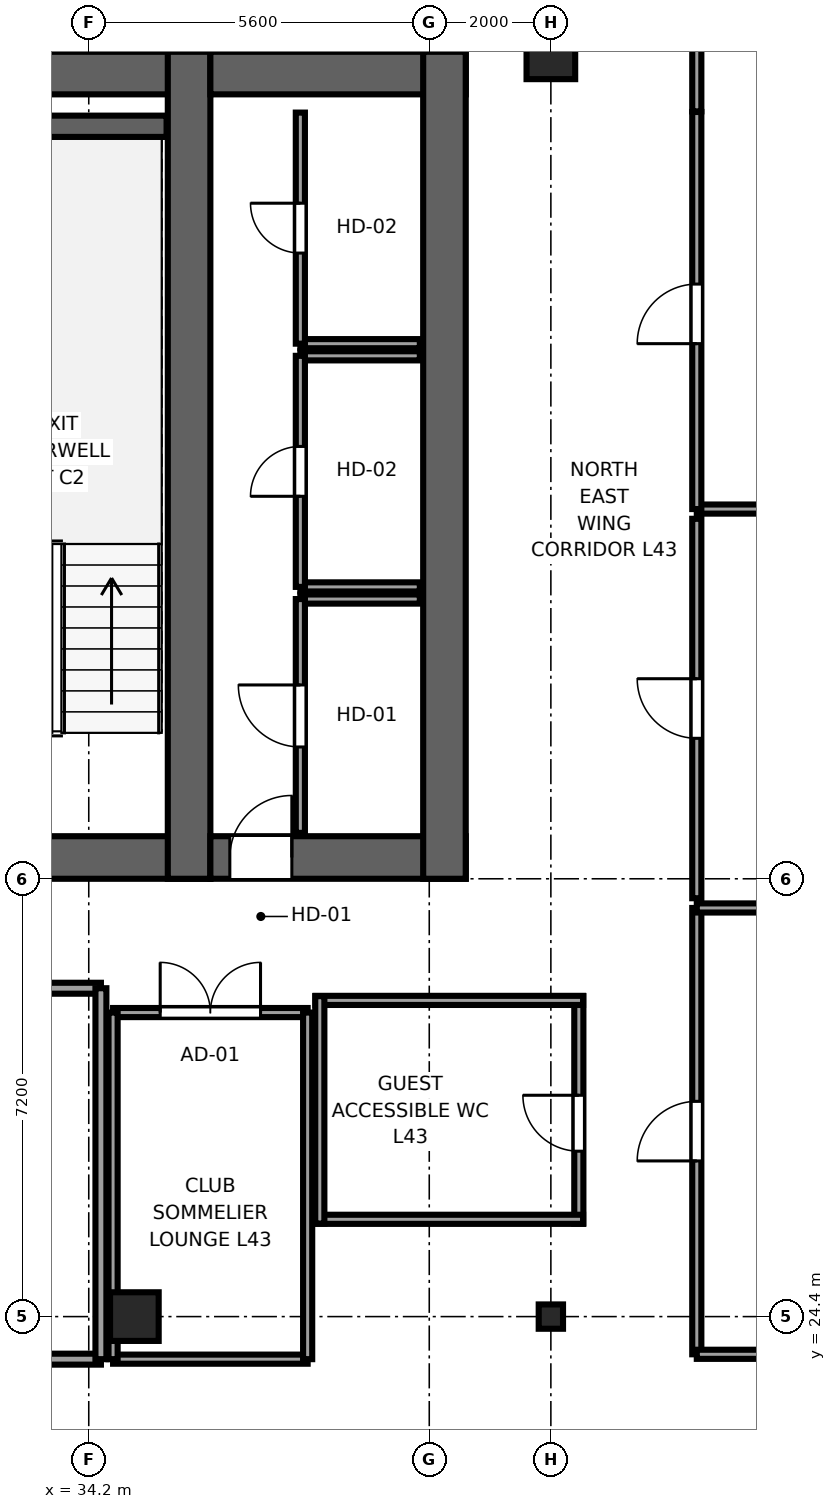
"""IFC4 building model, lengths in metres.
Left out: names, types, materials, properties, quantities, classifications, styles, units other than length and angle.
Written with IfcOpenShell. Run it as: python <this file> out.ifc"""

import sys

from ifc_helpers import new_model, si_unit, direction, frame, frame_2d, origin, origin_2d, place, context, subcontext, project, spatial, rectangle, i_section, extrude, source, transform, mapped, element, fill, save


model = new_model("IFC4")
c1 = context("Model", 3, precision=1e-05, world=origin(), true_north=direction((0.0, 1.0)))
c2 = subcontext(c1, "Body", "Model", "MODEL_VIEW")
j1 = project(units=[si_unit("LENGTHUNIT", "METRE"), si_unit("PLANEANGLEUNIT", "RADIAN")], contexts=[c1])
p1 = place(None, origin())
s1 = spatial("IfcSite", under=j1, at=p1, CompositionType="ELEMENT")
p2 = place(p1, origin())
s2 = spatial("IfcBuilding", under=s1, at=p2, CompositionType="ELEMENT")
p3 = place(p2, frame((0.0, 0.0, 164.8)))
s3 = spatial("IfcBuildingStorey", under=s2, at=p3, CompositionType="ELEMENT", Elevation=164.8)
p4 = place(p3, frame((9.8, 31.95, 0.0), z_axis=(0.0, 0.0, 1.0), x_axis=(1.0, 0.0, 0.0)))
e1 = element("IfcWall", 1, at=p4, inside=s3, PredefinedType="SHEAR", context=c2, shape_type="SweptSolid", body=[
    extrude(rectangle(XDim=26.4, YDim=0.7, at=frame_2d((13.2, 0.0))), origin(), (0.0, 0.0, 1.0), 3.55),
])
p5 = place(p4, frame((6.32, 0.0, 0.0), z_axis=(0.0, 0.0, 1.0), x_axis=(-1.0, 0.0, 0.0)))
e2 = element("IfcOpeningElement", 2, at=p5, cuts=e1, PredefinedType="OPENING", context=c2, shape_type="SweptSolid", body=[
    extrude(rectangle(XDim=1.5, YDim=2.04, at=frame_2d((0.75, 1.02))), frame((0.0, 0.36, 0.0), z_axis=(0.0, -1.0, 0.0), x_axis=(1.0, 0.0, 0.0)), (0.0, 0.0, 1.0), 0.72),
])
p6 = place(p4, frame((13.95, 0.0, 0.0), z_axis=(0.0, 0.0, 1.0), x_axis=(-1.0, 0.0, 0.0)))
e3 = element("IfcOpeningElement", 3, at=p6, cuts=e1, PredefinedType="OPENING", context=c2, shape_type="SweptSolid", body=[
    extrude(rectangle(XDim=1.5, YDim=2.04, at=frame_2d((0.75, 1.02))), frame((0.0, 0.36, 0.0), z_axis=(0.0, -1.0, 0.0), x_axis=(1.0, 0.0, 0.0)), (0.0, 0.0, 1.0), 0.72),
])
p7 = place(p4, frame((20.25, 0.0, 0.0), z_axis=(0.0, 0.0, 1.0), x_axis=(-1.0, 0.0, 0.0)))
e4 = element("IfcOpeningElement", 4, at=p7, cuts=e1, PredefinedType="OPENING", context=c2, shape_type="SweptSolid", body=[
    extrude(rectangle(XDim=1.5, YDim=2.04, at=frame_2d((0.75, 1.02))), frame((0.0, 0.36, 0.0), z_axis=(0.0, -1.0, 0.0), x_axis=(1.0, 0.0, 0.0)), (0.0, 0.0, 1.0), 0.72),
])
p8 = place(p4, frame((8.37, 0.0, 0.0), z_axis=(0.0, 0.0, 1.0), x_axis=(-1.0, 0.0, 0.0)))
e5 = element("IfcOpeningElement", 5, at=p8, cuts=e1, PredefinedType="OPENING", context=c2, shape_type="SweptSolid", body=[
    extrude(rectangle(XDim=0.82, YDim=2.01, at=frame_2d((0.41, 1.005))), frame((0.0, 0.36, 0.0), z_axis=(0.0, -1.0, 0.0), x_axis=(1.0, 0.0, 0.0)), (0.0, 0.0, 1.0), 0.72),
])
p9 = place(p3, frame((9.8, 44.85, 0.0), z_axis=(0.0, 0.0, 1.0), x_axis=(1.0, 0.0, 0.0)))
e6 = element("IfcWall", 6, at=p9, inside=s3, PredefinedType="SHEAR", context=c2, shape_type="SweptSolid", body=[
    extrude(rectangle(XDim=26.4, YDim=0.7, at=frame_2d((13.2, 0.0))), origin(), (0.0, 0.0, 1.0), 3.55),
])
p10 = place(p3, frame((35.85, 31.6, 0.0), z_axis=(0.0, 0.0, 1.0), x_axis=(0.0, 1.0, 0.0)))
e7 = element("IfcWall", 7, at=p10, inside=s3, PredefinedType="SHEAR", context=c2, shape_type="SweptSolid", body=[
    extrude(rectangle(XDim=13.6, YDim=0.7, at=frame_2d((6.8, 0.0))), origin(), (0.0, 0.0, 1.0), 3.55),
])
p11 = place(p3, frame((36.2, 31.95, 0.0), z_axis=(0.0, 0.0, 1.0), x_axis=(1.0, 0.0, 0.0)))
e8 = element("IfcWall", 8, at=p11, inside=s3, PredefinedType="SHEAR", context=c2, shape_type="SweptSolid", body=[
    extrude(rectangle(XDim=4.2, YDim=0.7, at=frame_2d((2.1, 0.0))), origin(), (0.0, 0.0, 1.0), 3.55),
])
p12 = place(p11, frame((1.34, 0.0, 0.0), z_axis=(0.0, 0.0, 1.0), x_axis=(-1.0, 0.0, 0.0)))
e9 = element("IfcOpeningElement", 9, at=p12, cuts=e8, PredefinedType="OPENING", context=c2, shape_type="SweptSolid", body=[
    extrude(rectangle(XDim=1.02, YDim=2.03, at=frame_2d((0.51, 1.015))), frame((0.0, 0.36, 0.0), z_axis=(0.0, -1.0, 0.0), x_axis=(1.0, 0.0, 0.0)), (0.0, 0.0, 1.0), 0.72),
])
p13 = place(p3, frame((36.2, 44.85, 0.0), z_axis=(0.0, 0.0, 1.0), x_axis=(1.0, 0.0, 0.0)))
e10 = element("IfcWall", 10, at=p13, inside=s3, PredefinedType="SHEAR", context=c2, shape_type="SweptSolid", body=[
    extrude(rectangle(XDim=4.2, YDim=0.7, at=frame_2d((2.1, 0.0))), origin(), (0.0, 0.0, 1.0), 3.55),
])
p14 = place(p3, frame((40.05, 31.6, 0.0), z_axis=(0.0, 0.0, 1.0), x_axis=(0.0, 1.0, 0.0)))
e11 = element("IfcWall", 11, at=p14, inside=s3, PredefinedType="SHEAR", context=c2, shape_type="SweptSolid", body=[
    extrude(rectangle(XDim=13.6, YDim=0.7, at=frame_2d((6.8, 0.0))), origin(), (0.0, 0.0, 1.0), 3.55),
])
p15 = place(p3, frame((31.88, 43.975, 0.0), z_axis=(0.0, 0.0, 1.0), x_axis=(1.0, 0.0, 0.0)))
e12 = element("IfcWall", 12, at=p15, inside=s3, PredefinedType="SHEAR", context=c2, shape_type="SweptSolid", body=[
    extrude(rectangle(XDim=3.6, YDim=0.35, at=frame_2d((1.8, 0.0))), origin(), (0.0, 0.0, 1.0), 3.55),
])
m1 = source(origin(), c2, "Body", "SweptSolid", [
    extrude(rectangle(XDim=0.8, YDim=0.8, at=origin_2d()), origin(), (0.0, 0.0, 1.0), 3.55),
])
p16 = place(p3, frame((34.95, 24.4, 0.0), z_axis=(0.0, 0.0, 1.0), x_axis=(1.0, 0.0, 0.0)))
e13 = element("IfcColumn", 13, at=p16, inside=s3, PredefinedType="COLUMN", context=c2, shape_type="MappedRepresentation", body=[
    mapped(m1, transform((0.0, 0.0, 0.0), x_axis=(1.0, 0.0, 0.0), y_axis=(0.0, 1.0, 0.0), z_axis=(0.0, 0.0, 1.0), scale=1.0)),
])
m2 = source(origin(), c2, "Body", "SweptSolid", [
    extrude(i_section(OverallWidth=0.4, OverallDepth=0.4, WebThickness=0.02, FlangeThickness=0.035, at=origin_2d()), origin(), (0.0, 0.0, 1.0), 3.55),
])
p17 = place(p3, frame((41.8, 24.4, 0.0), z_axis=(0.0, 0.0, 1.0), x_axis=(1.0, 0.0, 0.0)))
e14 = element("IfcColumn", 14, at=p17, inside=s3, PredefinedType="COLUMN", context=c2, shape_type="MappedRepresentation", body=[
    mapped(m2, transform((0.0, 0.0, 0.0), x_axis=(1.0, 0.0, 0.0), y_axis=(0.0, 1.0, 0.0), z_axis=(0.0, 0.0, 1.0), scale=1.0)),
])
p18 = place(p3, frame((41.8, 45.15, 0.0), z_axis=(0.0, 0.0, 1.0), x_axis=(1.0, 0.0, 0.0)))
e15 = element("IfcColumn", 15, at=p18, inside=s3, PredefinedType="COLUMN", context=c2, shape_type="MappedRepresentation", body=[
    mapped(m1, transform((0.0, 0.0, 0.0), x_axis=(1.0, 0.0, 0.0), y_axis=(0.0, 1.0, 0.0), z_axis=(0.0, 0.0, 1.0), scale=1.0)),
])
p19 = place(p3, frame((44.2, 37.68, 0.0), z_axis=(0.0, 0.0, 1.0), x_axis=(1.0, 0.0, 0.0)))
e16 = element("IfcWall", 16, at=p19, inside=s3, PredefinedType="PARTITIONING", context=c2, shape_type="SweptSolid", body=[
    extrude(rectangle(XDim=9.795, YDim=0.15, at=frame_2d((4.897, 0.0))), origin(), (0.0, 0.0, 1.0), 3.37),
])
p20 = place(p3, frame((37.68, 36.2, 0.0), z_axis=(0.0, 0.0, 1.0), x_axis=(1.0, 0.0, 0.0)))
e17 = element("IfcWall", 17, at=p20, inside=s3, PredefinedType="PARTITIONING", context=c2, shape_type="SweptSolid", body=[
    extrude(rectangle(XDim=1.965, YDim=0.15, at=frame_2d((0.982, 0.0))), origin(), (0.0, 0.0, 1.0), 3.37),
])
p21 = place(p3, frame((37.68, 32.355, 0.0), z_axis=(0.0, 0.0, 1.0), x_axis=(0.0, 1.0, 0.0)))
e18 = element("IfcWall", 18, at=p21, inside=s3, PredefinedType="PARTITIONING", context=c2, shape_type="SweptSolid", body=[
    extrude(rectangle(XDim=3.845, YDim=0.15, at=frame_2d((1.922, 0.0))), origin(), (0.0, 0.0, 1.0), 3.37),
])
p22 = place(p21, frame((1.413, 0.0, 0.0)))
e19 = element("IfcOpeningElement", 19, at=p22, cuts=e18, PredefinedType="OPENING", context=c2, shape_type="SweptSolid", body=[
    extrude(rectangle(XDim=1.02, YDim=2.03, at=frame_2d((0.51, 1.015))), frame((0.0, 0.085, 0.0), z_axis=(0.0, -1.0, 0.0), x_axis=(1.0, 0.0, 0.0)), (0.0, 0.0, 1.0), 0.17),
])
for number, where, z_axis, x_axis in (
    (20, (37.68, 36.4, 0.0), (0.0, 0.0, 1.0), (1.0, 0.0, 0.0)),
    (21, (37.68, 40.2, 0.0), (0.0, 0.0, 1.0), (1.0, 0.0, 0.0)),
):
    element("IfcWall", number, at=place(p3, frame(where, z_axis=z_axis, x_axis=x_axis)), inside=s3, PredefinedType="PARTITIONING", context=c2, shape_type="SweptSolid", body=[
        extrude(rectangle(XDim=1.965, YDim=0.15, at=frame_2d((0.982, 0.0))), origin(), (0.0, 0.0, 1.0), 3.37),
    ])
p23 = place(p3, frame((37.68, 36.4, 0.0), z_axis=(0.0, 0.0, 1.0), x_axis=(0.0, 1.0, 0.0)))
e22 = element("IfcWall", 22, at=p23, inside=s3, PredefinedType="PARTITIONING", context=c2, shape_type="SweptSolid", body=[
    extrude(rectangle(XDim=3.8, YDim=0.15, at=frame_2d((1.9, 0.0))), origin(), (0.0, 0.0, 1.0), 3.37),
])
p24 = place(p23, frame((1.49, 0.0, 0.0)))
e23 = element("IfcOpeningElement", 23, at=p24, cuts=e22, PredefinedType="OPENING", context=c2, shape_type="SweptSolid", body=[
    extrude(rectangle(XDim=0.82, YDim=2.01, at=frame_2d((0.41, 1.005))), frame((0.0, 0.085, 0.0), z_axis=(0.0, -1.0, 0.0), x_axis=(1.0, 0.0, 0.0)), (0.0, 0.0, 1.0), 0.17),
])
p25 = place(p3, frame((37.68, 40.4, 0.0), z_axis=(0.0, 0.0, 1.0), x_axis=(1.0, 0.0, 0.0)))
e24 = element("IfcWall", 24, at=p25, inside=s3, PredefinedType="PARTITIONING", context=c2, shape_type="SweptSolid", body=[
    extrude(rectangle(XDim=1.965, YDim=0.15, at=frame_2d((0.982, 0.0))), origin(), (0.0, 0.0, 1.0), 3.37),
])
p26 = place(p3, frame((37.68, 40.4, 0.0), z_axis=(0.0, 0.0, 1.0), x_axis=(0.0, 1.0, 0.0)))
e25 = element("IfcWall", 25, at=p26, inside=s3, PredefinedType="PARTITIONING", context=c2, shape_type="SweptSolid", body=[
    extrude(rectangle(XDim=3.8, YDim=0.15, at=frame_2d((1.9, 0.0))), origin(), (0.0, 0.0, 1.0), 3.37),
])
p27 = place(p26, frame((1.49, 0.0, 0.0)))
e26 = element("IfcOpeningElement", 26, at=p27, cuts=e25, PredefinedType="OPENING", context=c2, shape_type="SweptSolid", body=[
    extrude(rectangle(XDim=0.82, YDim=2.01, at=frame_2d((0.41, 1.005))), frame((0.0, 0.085, 0.0), z_axis=(0.0, -1.0, 0.0), x_axis=(1.0, 0.0, 0.0)), (0.0, 0.0, 1.0), 0.17),
])
p28 = place(p3, frame((44.2, 23.78, 0.0), z_axis=(0.0, 0.0, 1.0), x_axis=(0.0, 1.0, 0.0)))
e27 = element("IfcWall", 27, at=p28, inside=s3, PredefinedType="PARTITIONING", context=c2, shape_type="SweptSolid", body=[
    extrude(rectangle(XDim=7.34, YDim=0.15, at=frame_2d((3.67, 0.0))), origin(), (0.0, 0.0, 1.0), 3.37),
])
p29 = place(p28, frame((3.18, 0.0, 0.0)))
e28 = element("IfcOpeningElement", 28, at=p29, cuts=e27, PredefinedType="OPENING", context=c2, shape_type="SweptSolid", body=[
    extrude(rectangle(XDim=0.98, YDim=2.12, at=frame_2d((0.49, 1.06))), frame((0.0, 0.085, 0.0), z_axis=(0.0, -1.0, 0.0), x_axis=(1.0, 0.0, 0.0)), (0.0, 0.0, 1.0), 0.17),
])
p30 = place(p3, frame((44.2, 23.78, 0.0), z_axis=(0.0, 0.0, 1.0), x_axis=(1.0, 0.0, 0.0)))
e29 = element("IfcWall", 29, at=p30, inside=s3, PredefinedType="PARTITIONING", context=c2, shape_type="SweptSolid", body=[
    extrude(rectangle(XDim=9.795, YDim=0.15, at=frame_2d((4.897, 0.0))), origin(), (0.0, 0.0, 1.0), 3.37),
])
p31 = place(p3, frame((44.2, 31.12, 0.0), z_axis=(0.0, 0.0, 1.0), x_axis=(1.0, 0.0, 0.0)))
e30 = element("IfcWall", 30, at=p31, inside=s3, PredefinedType="PARTITIONING", context=c2, shape_type="SweptSolid", body=[
    extrude(rectangle(XDim=7.43, YDim=0.15, at=frame_2d((3.715, 0.0))), origin(), (0.0, 0.0, 1.0), 3.37),
])
p32 = place(p3, frame((44.2, 31.28, 0.0), z_axis=(0.0, 0.0, 1.0), x_axis=(0.0, 1.0, 0.0)))
e31 = element("IfcWall", 31, at=p32, inside=s3, PredefinedType="PARTITIONING", context=c2, shape_type="SweptSolid", body=[
    extrude(rectangle(XDim=6.24, YDim=0.15, at=frame_2d((3.12, 0.0))), origin(), (0.0, 0.0, 1.0), 3.37),
])
p33 = place(p32, frame((2.63, 0.0, 0.0)))
e32 = element("IfcOpeningElement", 32, at=p33, cuts=e31, PredefinedType="OPENING", context=c2, shape_type="SweptSolid", body=[
    extrude(rectangle(XDim=0.98, YDim=2.12, at=frame_2d((0.49, 1.06))), frame((0.0, 0.085, 0.0), z_axis=(0.0, -1.0, 0.0), x_axis=(1.0, 0.0, 0.0)), (0.0, 0.0, 1.0), 0.17),
])
p34 = place(p3, frame((44.2, 37.68, 0.0), z_axis=(0.0, 0.0, 1.0), x_axis=(0.0, 1.0, 0.0)))
e33 = element("IfcWall", 33, at=p34, inside=s3, PredefinedType="PARTITIONING", context=c2, shape_type="SweptSolid", body=[
    extrude(rectangle(XDim=6.53, YDim=0.15, at=frame_2d((3.265, 0.0))), origin(), (0.0, 0.0, 1.0), 3.37),
])
p35 = place(p34, frame((2.72, 0.0, 0.0)))
e34 = element("IfcOpeningElement", 34, at=p35, cuts=e33, PredefinedType="OPENING", context=c2, shape_type="SweptSolid", body=[
    extrude(rectangle(XDim=0.98, YDim=2.12, at=frame_2d((0.49, 1.06))), frame((0.0, 0.085, 0.0), z_axis=(0.0, -1.0, 0.0), x_axis=(1.0, 0.0, 0.0)), (0.0, 0.0, 1.0), 0.17),
])
p36 = place(p3, frame((44.2, 44.22, 0.0), z_axis=(0.0, 0.0, 1.0), x_axis=(0.0, 1.0, 0.0)))
e35 = element("IfcWall", 35, at=p36, inside=s3, PredefinedType="PARTITIONING", context=c2, shape_type="SweptSolid", body=[
    extrude(rectangle(XDim=1.375, YDim=0.15, at=frame_2d((0.688, 0.0))), origin(), (0.0, 0.0, 1.0), 3.37),
])
p37 = place(p3, frame((42.26, 25.93, 0.0), z_axis=(0.0, 0.0, 1.0), x_axis=(0.0, 1.0, 0.0)))
e36 = element("IfcWall", 36, at=p37, inside=s3, PredefinedType="PARTITIONING", context=c2, shape_type="SweptSolid", body=[
    extrude(rectangle(XDim=3.74, YDim=0.15, at=frame_2d((1.87, 0.0))), origin(), (0.0, 0.0, 1.0), 3.37),
])
p38 = place(p37, frame((1.19, 0.0, 0.0)))
e37 = element("IfcOpeningElement", 37, at=p38, cuts=e36, PredefinedType="OPENING", context=c2, shape_type="SweptSolid", body=[
    extrude(rectangle(XDim=0.92, YDim=2.01, at=frame_2d((0.46, 1.005))), frame((0.0, 0.085, 0.0), z_axis=(0.0, -1.0, 0.0), x_axis=(1.0, 0.0, 0.0)), (0.0, 0.0, 1.0), 0.17),
])
for number, where, z_axis, x_axis in (
    (38, (37.93, 26.0, 0.0), (0.0, 0.0, 1.0), (1.0, 0.0, 0.0)),
    (39, (37.93, 29.6, 0.0), (0.0, 0.0, 1.0), (1.0, 0.0, 0.0)),
):
    element("IfcWall", number, at=place(p3, frame(where, z_axis=z_axis, x_axis=x_axis)), inside=s3, PredefinedType="PARTITIONING", context=c2, shape_type="SweptSolid", body=[
        extrude(rectangle(XDim=4.4, YDim=0.15, at=frame_2d((2.2, 0.0))), origin(), (0.0, 0.0, 1.0), 3.37),
    ])
p39 = place(p3, frame((38.0, 25.93, 0.0), z_axis=(0.0, 0.0, 1.0), x_axis=(0.0, 1.0, 0.0)))
e40 = element("IfcWall", 40, at=p39, inside=s3, PredefinedType="PARTITIONING", context=c2, shape_type="SweptSolid", body=[
    extrude(rectangle(XDim=3.74, YDim=0.15, at=frame_2d((1.87, 0.0))), origin(), (0.0, 0.0, 1.0), 3.37),
])
p40 = place(p3, frame((27.1, 23.7, 0.0), z_axis=(0.0, 0.0, 1.0), x_axis=(1.0, 0.0, 0.0)))
e41 = element("IfcWall", 41, at=p40, inside=s3, PredefinedType="PARTITIONING", context=c2, shape_type="SweptSolid", body=[
    extrude(rectangle(XDim=7.3, YDim=0.18, at=frame_2d((3.65, 0.0))), origin(), (0.0, 0.0, 1.0), 3.37),
])
p41 = place(p40, frame((2.825, 0.0, 0.0)))
e42 = element("IfcOpeningElement", 42, at=p41, cuts=e41, PredefinedType="OPENING", context=c2, shape_type="SweptSolid", body=[
    extrude(rectangle(XDim=1.65, YDim=2.15, at=frame_2d((0.825, 1.075))), frame((0.0, 0.1, 0.0), z_axis=(0.0, -1.0, 0.0), x_axis=(1.0, 0.0, 0.0)), (0.0, 0.0, 1.0), 0.2),
])
p42 = place(p3, frame((27.1, 29.8, 0.0), z_axis=(0.0, 0.0, 1.0), x_axis=(1.0, 0.0, 0.0)))
e43 = element("IfcWall", 43, at=p42, inside=s3, PredefinedType="PARTITIONING", context=c2, shape_type="SweptSolid", body=[
    extrude(rectangle(XDim=7.3, YDim=0.18, at=frame_2d((3.65, 0.0))), origin(), (0.0, 0.0, 1.0), 3.37),
])
p43 = place(p3, frame((34.4, 23.7, 0.0), z_axis=(0.0, 0.0, 1.0), x_axis=(0.0, 1.0, 0.0)))
e44 = element("IfcWall", 44, at=p43, inside=s3, PredefinedType="PARTITIONING", context=c2, shape_type="SweptSolid", body=[
    extrude(rectangle(XDim=6.1, YDim=0.18, at=frame_2d((3.05, 0.0))), origin(), (0.0, 0.0, 1.0), 3.37),
])
p44 = place(p3, frame((34.6, 23.7, 0.0), z_axis=(0.0, 0.0, 1.0), x_axis=(1.0, 0.0, 0.0)))
e45 = element("IfcWall", 45, at=p44, inside=s3, PredefinedType="PARTITIONING", context=c2, shape_type="SweptSolid", body=[
    extrude(rectangle(XDim=3.2, YDim=0.15, at=frame_2d((1.6, 0.0))), origin(), (0.0, 0.0, 1.0), 3.37),
])
p45 = place(p3, frame((34.6, 29.4, 0.0), z_axis=(0.0, 0.0, 1.0), x_axis=(1.0, 0.0, 0.0)))
e46 = element("IfcWall", 46, at=p45, inside=s3, PredefinedType="PARTITIONING", context=c2, shape_type="SweptSolid", body=[
    extrude(rectangle(XDim=3.2, YDim=0.15, at=frame_2d((1.6, 0.0))), origin(), (0.0, 0.0, 1.0), 3.37),
])
p46 = place(p45, frame((0.775, 0.0, 0.0)))
e47 = element("IfcOpeningElement", 47, at=p46, cuts=e46, PredefinedType="OPENING", context=c2, shape_type="SweptSolid", body=[
    extrude(rectangle(XDim=1.65, YDim=2.15, at=frame_2d((0.825, 1.075))), frame((0.0, 0.085, 0.0), z_axis=(0.0, -1.0, 0.0), x_axis=(1.0, 0.0, 0.0)), (0.0, 0.0, 1.0), 0.17),
])
for number, where, z_axis, x_axis in (
    (48, (34.6, 23.7, 0.0), (0.0, 0.0, 1.0), (0.0, 1.0, 0.0)),
    (49, (37.8, 23.7, 0.0), (0.0, 0.0, 1.0), (0.0, 1.0, 0.0)),
):
    element("IfcWall", number, at=place(p3, frame(where, z_axis=z_axis, x_axis=x_axis)), inside=s3, PredefinedType="PARTITIONING", context=c2, shape_type="SweptSolid", body=[
        extrude(rectangle(XDim=5.7, YDim=0.15, at=frame_2d((2.85, 0.0))), origin(), (0.0, 0.0, 1.0), 3.37),
    ])
m3 = source(origin(), c2, "Body", "SweptSolid", [
    extrude(rectangle(XDim=1.02, YDim=2.03, at=frame_2d((0.51, 1.015))), frame((0.0, 0.025, 0.0), z_axis=(0.0, -1.0, 0.0), x_axis=(1.0, 0.0, 0.0)), (0.0, 0.0, 1.0), 0.05),
])
p47 = place(p12, origin())
e50 = element("IfcDoor", 50, at=p47, inside=s3, OperationType="SINGLE_SWING_RIGHT", PredefinedType="DOOR", context=c2, shape_type="MappedRepresentation", body=[
    mapped(m3, transform((0.0, 0.0, 0.0), x_axis=(1.0, 0.0, 0.0), y_axis=(0.0, 1.0, 0.0), z_axis=(0.0, 0.0, 1.0), scale=1.0)),
])
fill(e9, e50)
p48 = place(p22, origin())
e51 = element("IfcDoor", 51, at=p48, inside=s3, OperationType="SINGLE_SWING_RIGHT", PredefinedType="DOOR", context=c2, shape_type="MappedRepresentation", body=[
    mapped(m3, transform((0.0, 0.0, 0.0), x_axis=(1.0, 0.0, 0.0), y_axis=(0.0, 1.0, 0.0), z_axis=(0.0, 0.0, 1.0), scale=1.0)),
])
fill(e19, e51)
m4 = source(origin(), c2, "Body", "SweptSolid", [
    extrude(rectangle(XDim=0.82, YDim=2.01, at=frame_2d((0.41, 1.005))), frame((0.0, 0.025, 0.0), z_axis=(0.0, -1.0, 0.0), x_axis=(1.0, 0.0, 0.0)), (0.0, 0.0, 1.0), 0.05),
])
p49 = place(p24, origin())
e52 = element("IfcDoor", 52, at=p49, inside=s3, OperationType="SINGLE_SWING_LEFT", PredefinedType="DOOR", context=c2, shape_type="MappedRepresentation", body=[
    mapped(m4, transform((0.0, 0.0, 0.0), x_axis=(1.0, 0.0, 0.0), y_axis=(0.0, 1.0, 0.0), z_axis=(0.0, 0.0, 1.0), scale=1.0)),
])
fill(e23, e52)
p50 = place(p27, origin())
e53 = element("IfcDoor", 53, at=p50, inside=s3, OperationType="SINGLE_SWING_RIGHT", PredefinedType="DOOR", context=c2, shape_type="MappedRepresentation", body=[
    mapped(m4, transform((0.0, 0.0, 0.0), x_axis=(1.0, 0.0, 0.0), y_axis=(0.0, 1.0, 0.0), z_axis=(0.0, 0.0, 1.0), scale=1.0)),
])
fill(e26, e53)
m5 = source(origin(), c2, "Body", "SweptSolid", [
    extrude(rectangle(XDim=0.98, YDim=2.12, at=frame_2d((0.49, 1.06))), frame((0.0, 0.025, 0.0), z_axis=(0.0, -1.0, 0.0), x_axis=(1.0, 0.0, 0.0)), (0.0, 0.0, 1.0), 0.05),
])
p51 = place(p29, origin())
e54 = element("IfcDoor", 54, at=p51, inside=s3, OperationType="SINGLE_SWING_LEFT", PredefinedType="DOOR", context=c2, shape_type="MappedRepresentation", body=[
    mapped(m5, transform((0.0, 0.0, 0.0), x_axis=(1.0, 0.0, 0.0), y_axis=(0.0, 1.0, 0.0), z_axis=(0.0, 0.0, 1.0), scale=1.0)),
])
fill(e28, e54)
p52 = place(p33, origin())
e55 = element("IfcDoor", 55, at=p52, inside=s3, OperationType="SINGLE_SWING_RIGHT", PredefinedType="DOOR", context=c2, shape_type="MappedRepresentation", body=[
    mapped(m5, transform((0.0, 0.0, 0.0), x_axis=(1.0, 0.0, 0.0), y_axis=(0.0, 1.0, 0.0), z_axis=(0.0, 0.0, 1.0), scale=1.0)),
])
fill(e32, e55)
p53 = place(p35, origin())
e56 = element("IfcDoor", 56, at=p53, inside=s3, OperationType="SINGLE_SWING_LEFT", PredefinedType="DOOR", context=c2, shape_type="MappedRepresentation", body=[
    mapped(m5, transform((0.0, 0.0, 0.0), x_axis=(1.0, 0.0, 0.0), y_axis=(0.0, 1.0, 0.0), z_axis=(0.0, 0.0, 1.0), scale=1.0)),
])
fill(e34, e56)
m6 = source(origin(), c2, "Body", "SweptSolid", [
    extrude(rectangle(XDim=0.92, YDim=2.01, at=frame_2d((0.46, 1.005))), frame((0.0, 0.025, 0.0), z_axis=(0.0, -1.0, 0.0), x_axis=(1.0, 0.0, 0.0)), (0.0, 0.0, 1.0), 0.05),
])
p54 = place(p38, origin())
e57 = element("IfcDoor", 57, at=p54, inside=s3, OperationType="SINGLE_SWING_RIGHT", PredefinedType="DOOR", context=c2, shape_type="MappedRepresentation", body=[
    mapped(m6, transform((0.0, 0.0, 0.0), x_axis=(1.0, 0.0, 0.0), y_axis=(0.0, 1.0, 0.0), z_axis=(0.0, 0.0, 1.0), scale=1.0)),
])
fill(e37, e57)
m7 = source(origin(), c2, "Body", "SweptSolid", [
    extrude(rectangle(XDim=1.65, YDim=2.15, at=frame_2d((0.825, 1.075))), frame((0.0, 0.025, 0.0), z_axis=(0.0, -1.0, 0.0), x_axis=(1.0, 0.0, 0.0)), (0.0, 0.0, 1.0), 0.05),
])
p55 = place(p46, origin())
e58 = element("IfcDoor", 58, at=p55, inside=s3, OperationType="DOUBLE_DOOR_SINGLE_SWING", PredefinedType="DOOR", context=c2, shape_type="MappedRepresentation", body=[
    mapped(m7, transform((0.0, 0.0, 0.0), x_axis=(1.0, 0.0, 0.0), y_axis=(0.0, 1.0, 0.0), z_axis=(0.0, 0.0, 1.0), scale=1.0)),
])
fill(e47, e58)
save(model, sys.argv[1])
